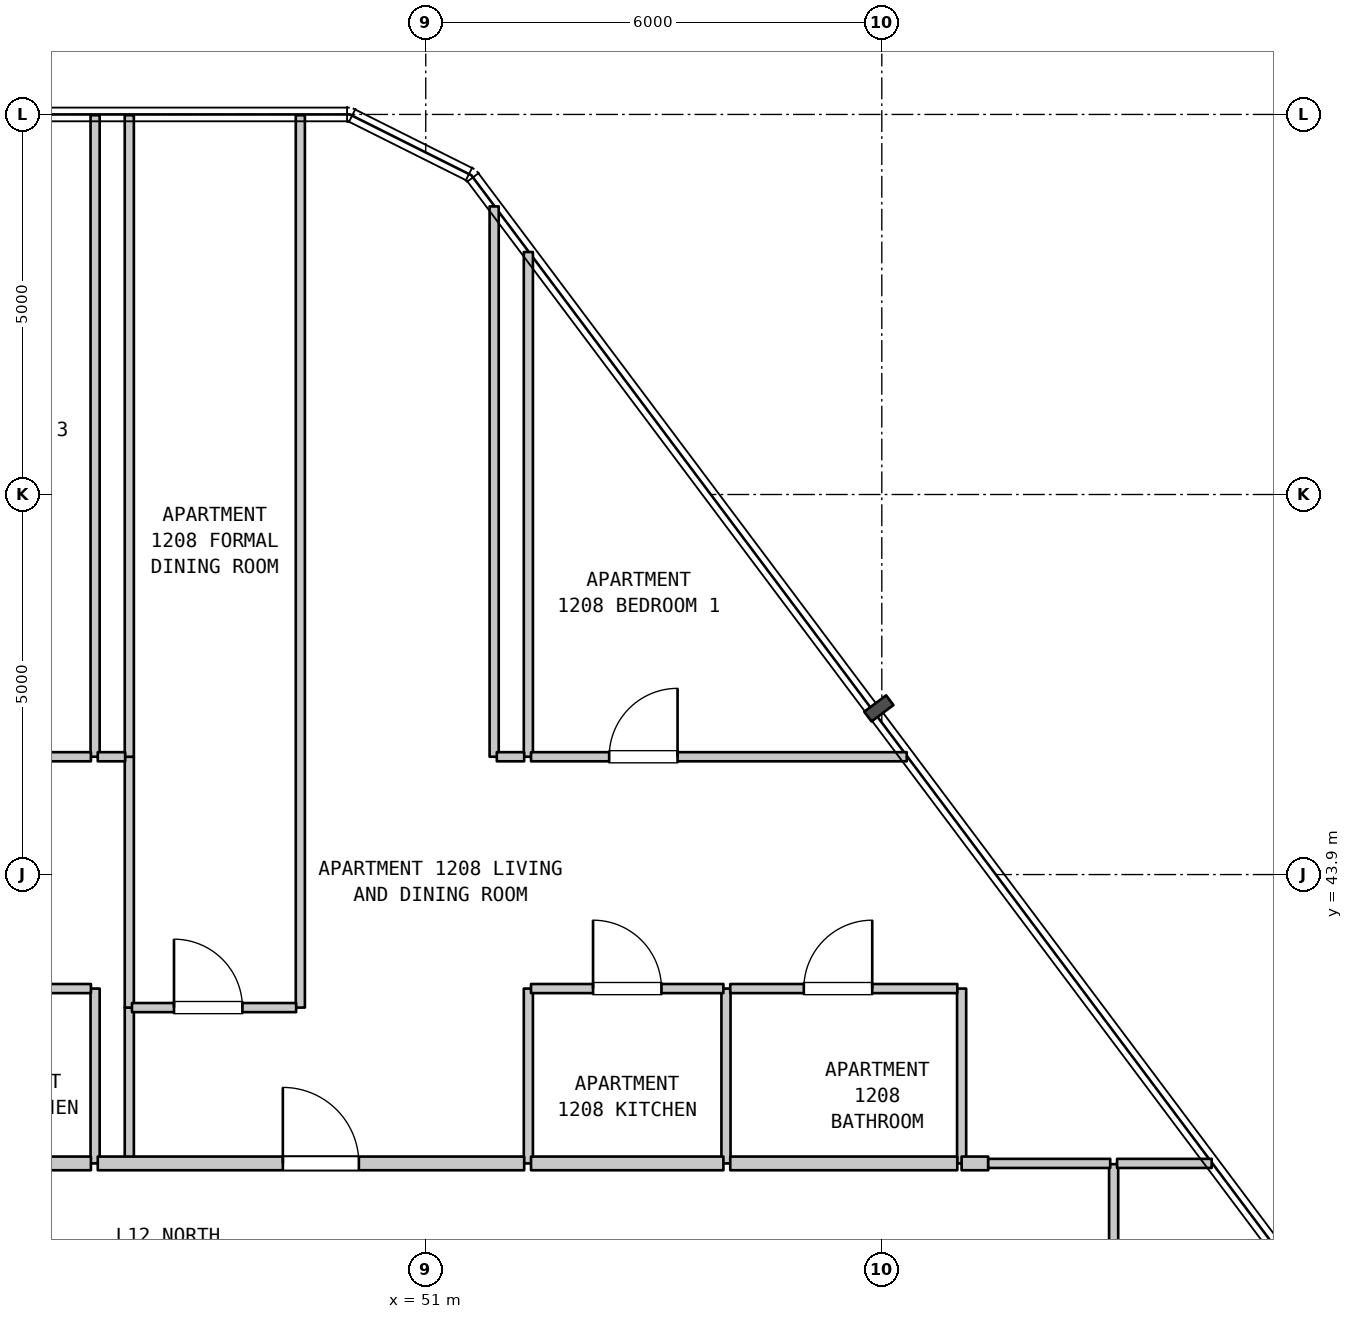
"""IFC4 building model, lengths in metres.
Left out: names, types, materials, properties, quantities, classifications, styles, units other than length and angle.
Written with IfcOpenShell. Run it as: python <this file> out.ifc"""

import sys

from ifc_helpers import new_model, si_unit, direction, frame, frame_2d, origin, place, context, subcontext, project, spatial, rectangle, extrude, element, fill, save


model = new_model("IFC4")
c1 = context("Model", 3, precision=1e-05, world=origin(), true_north=direction((0.0, 1.0)))
c2 = subcontext(c1, "Body", "Model", "MODEL_VIEW")
j1 = project(units=[si_unit("LENGTHUNIT", "METRE"), si_unit("PLANEANGLEUNIT", "RADIAN")], contexts=[c1])
p1 = place(None, origin())
s1 = spatial("IfcSite", under=j1, at=p1, CompositionType="ELEMENT")
p2 = place(p1, origin())
s2 = spatial("IfcBuilding", under=s1, at=p2, CompositionType="ELEMENT")
p3 = place(p2, frame((0.0, 0.0, 53.6)))
s3 = spatial("IfcBuildingStorey", under=s2, at=p3, CompositionType="ELEMENT", Elevation=53.6)
p4 = place(p3, frame((46.65, 40.1, 0.0), z_axis=(0.0, 0.0, 1.0), x_axis=(0.0, 1.0, 0.0)))
e1 = element("IfcWall", 1, at=p4, inside=s3, PredefinedType="PARTITIONING", context=c2, shape_type="SweptSolid", body=[
    extrude(rectangle(XDim=2.3, YDim=0.12, at=frame_2d((1.15, 0.0))), origin(), (0.0, 0.0, 1.0), 3.385),
])
p5 = place(p3, frame((46.65, 45.45, 0.0), z_axis=(0.0, 0.0, 1.0), x_axis=(0.0, 1.0, 0.0)))
e2 = element("IfcWall", 2, at=p5, inside=s3, PredefinedType="PARTITIONING", context=c2, shape_type="SweptSolid", body=[
    extrude(rectangle(XDim=8.44, YDim=0.12, at=frame_2d((4.22, 0.0))), origin(), (0.0, 0.0, 1.0), 3.385),
])
p6 = place(p3, frame((47.1, 40.1, 0.0), z_axis=(0.0, 0.0, 1.0), x_axis=(0.0, 1.0, 0.0)))
e3 = element("IfcWall", 3, at=p6, inside=s3, PredefinedType="PARTITIONING", context=c2, shape_type="SweptSolid", body=[
    extrude(rectangle(XDim=2.05, YDim=0.12, at=frame_2d((1.025, 0.0))), origin(), (0.0, 0.0, 1.0), 3.385),
])
p7 = place(p3, frame((47.1, 42.15, 0.0), z_axis=(0.0, 0.0, 1.0), x_axis=(0.0, 1.0, 0.0)))
e4 = element("IfcWall", 4, at=p7, inside=s3, PredefinedType="PARTITIONING", context=c2, shape_type="SweptSolid", body=[
    extrude(rectangle(XDim=3.3, YDim=0.12, at=frame_2d((1.65, 0.0))), origin(), (0.0, 0.0, 1.0), 3.385),
])
p8 = place(p3, frame((47.1, 45.45, 0.0), z_axis=(0.0, 0.0, 1.0), x_axis=(0.0, 1.0, 0.0)))
e5 = element("IfcWall", 5, at=p8, inside=s3, PredefinedType="PARTITIONING", context=c2, shape_type="SweptSolid", body=[
    extrude(rectangle(XDim=8.44, YDim=0.12, at=frame_2d((4.22, 0.0))), origin(), (0.0, 0.0, 1.0), 3.385),
])
p9 = place(p3, frame((49.35, 42.15, 0.0), z_axis=(0.0, 0.0, 1.0), x_axis=(0.0, 1.0, 0.0)))
e6 = element("IfcWall", 6, at=p9, inside=s3, PredefinedType="PARTITIONING", context=c2, shape_type="SweptSolid", body=[
    extrude(rectangle(XDim=11.74, YDim=0.12, at=frame_2d((5.87, 0.0))), origin(), (0.0, 0.0, 1.0), 3.385),
])
p10 = place(p3, frame((51.9, 45.45, 0.0), z_axis=(0.0, 0.0, 1.0), x_axis=(0.0, 1.0, 0.0)))
e7 = element("IfcWall", 7, at=p10, inside=s3, PredefinedType="PARTITIONING", context=c2, shape_type="SweptSolid", body=[
    extrude(rectangle(XDim=7.24, YDim=0.12, at=frame_2d((3.62, 0.0))), origin(), (0.0, 0.0, 1.0), 3.385),
])
p11 = place(p3, frame((52.35, 40.1, 0.0), z_axis=(0.0, 0.0, 1.0), x_axis=(0.0, 1.0, 0.0)))
e8 = element("IfcWall", 8, at=p11, inside=s3, PredefinedType="PARTITIONING", context=c2, shape_type="SweptSolid", body=[
    extrude(rectangle(XDim=2.3, YDim=0.12, at=frame_2d((1.15, 0.0))), origin(), (0.0, 0.0, 1.0), 3.385),
])
p12 = place(p3, frame((52.35, 45.45, 0.0), z_axis=(0.0, 0.0, 1.0), x_axis=(0.0, 1.0, 0.0)))
e9 = element("IfcWall", 9, at=p12, inside=s3, PredefinedType="PARTITIONING", context=c2, shape_type="SweptSolid", body=[
    extrude(rectangle(XDim=6.64, YDim=0.12, at=frame_2d((3.32, 0.0))), origin(), (0.0, 0.0, 1.0), 3.385),
])
for number, where, z_axis, x_axis in (
    (10, (54.95, 40.1, 0.0), (0.0, 0.0, 1.0), (0.0, 1.0, 0.0)),
    (11, (58.05, 40.1, 0.0), (0.0, 0.0, 1.0), (0.0, 1.0, 0.0)),
):
    element("IfcWall", number, at=place(p3, frame(where, z_axis=z_axis, x_axis=x_axis)), inside=s3, PredefinedType="PARTITIONING", context=c2, shape_type="SweptSolid", body=[
        extrude(rectangle(XDim=2.3, YDim=0.12, at=frame_2d((1.15, 0.0))), origin(), (0.0, 0.0, 1.0), 3.385),
    ])
p13 = place(p3, frame((60.05, 37.89, 0.0), z_axis=(0.0, 0.0, 1.0), x_axis=(0.0, 1.0, 0.0)))
e12 = element("IfcWall", 12, at=p13, inside=s3, PredefinedType="PARTITIONING", context=c2, shape_type="SweptSolid", body=[
    extrude(rectangle(XDim=2.2, YDim=0.12, at=frame_2d((1.1, 0.0))), origin(), (0.0, 0.0, 1.0), 3.385),
])
p14 = place(p3, frame((43.288, 40.1, 0.0), z_axis=(0.0, 0.0, 1.0), x_axis=(1.0, 0.0, 0.0)))
e13 = element("IfcWall", 13, at=p14, inside=s3, PredefinedType="STANDARD", context=c2, shape_type="SweptSolid", body=[
    extrude(rectangle(XDim=3.307, YDim=0.18, at=frame_2d((1.653, 0.0))), origin(), (0.0, 0.0, 1.0), 3.385),
])
p15 = place(p3, frame((46.685, 40.1, 0.0), z_axis=(0.0, 0.0, 1.0), x_axis=(1.0, 0.0, 0.0)))
e14 = element("IfcWall", 14, at=p15, inside=s3, PredefinedType="STANDARD", context=c2, shape_type="SweptSolid", body=[
    extrude(rectangle(XDim=5.61, YDim=0.18, at=frame_2d((2.805, 0.0))), origin(), (0.0, 0.0, 1.0), 3.385),
])
p16 = place(p15, frame((2.435, 0.0, 0.0)))
e15 = element("IfcOpeningElement", 15, at=p16, cuts=e14, PredefinedType="OPENING", context=c2, shape_type="SweptSolid", body=[
    extrude(rectangle(XDim=1.0, YDim=2.15, at=frame_2d((0.5, 1.075))), frame((0.0, 0.1, 0.0), z_axis=(0.0, -1.0, 0.0), x_axis=(1.0, 0.0, 0.0)), (0.0, 0.0, 1.0), 0.2),
])
p17 = place(p3, frame((52.385, 40.1, 0.0), z_axis=(0.0, 0.0, 1.0), x_axis=(1.0, 0.0, 0.0)))
e16 = element("IfcWall", 16, at=p17, inside=s3, PredefinedType="STANDARD", context=c2, shape_type="SweptSolid", body=[
    extrude(rectangle(XDim=2.531, YDim=0.18, at=frame_2d((1.266, 0.0))), origin(), (0.0, 0.0, 1.0), 3.385),
])
p18 = place(p3, frame((55.006, 40.1, 0.0), z_axis=(0.0, 0.0, 1.0), x_axis=(1.0, 0.0, 0.0)))
e17 = element("IfcWall", 17, at=p18, inside=s3, PredefinedType="STANDARD", context=c2, shape_type="SweptSolid", body=[
    extrude(rectangle(XDim=2.987, YDim=0.18, at=frame_2d((1.493, 0.0))), origin(), (0.0, 0.0, 1.0), 3.385),
])
p19 = place(p3, frame((58.05, 40.1, 0.0), z_axis=(0.0, 0.0, 1.0), x_axis=(1.0, 0.0, 0.0)))
e18 = element("IfcWall", 18, at=p19, inside=s3, PredefinedType="STANDARD", context=c2, shape_type="SweptSolid", body=[
    extrude(rectangle(XDim=0.35, YDim=0.18, at=frame_2d((0.175, 0.0))), origin(), (0.0, 0.0, 1.0), 3.385),
])
p20 = place(p3, frame((58.4, 40.1, 0.0), z_axis=(0.0, 0.0, 1.0), x_axis=(1.0, 0.0, 0.0)))
e19 = element("IfcWall", 19, at=p20, inside=s3, PredefinedType="PARTITIONING", context=c2, shape_type="SweptSolid", body=[
    extrude(rectangle(XDim=1.605, YDim=0.12, at=frame_2d((0.802, 0.0))), origin(), (0.0, 0.0, 1.0), 3.385),
])
p21 = place(p3, frame((60.095, 40.1, 0.0), z_axis=(0.0, 0.0, 1.0), x_axis=(1.0, 0.0, 0.0)))
e20 = element("IfcWall", 20, at=p21, inside=s3, PredefinedType="PARTITIONING", context=c2, shape_type="SweptSolid", body=[
    extrude(rectangle(XDim=1.245, YDim=0.12, at=frame_2d((0.623, 0.0))), origin(), (0.0, 0.0, 1.0), 3.385),
])
p22 = place(p3, frame((47.135, 42.15, 0.0), z_axis=(0.0, 0.0, 1.0), x_axis=(1.0, 0.0, 0.0)))
e21 = element("IfcWall", 21, at=p22, inside=s3, PredefinedType="PARTITIONING", context=c2, shape_type="SweptSolid", body=[
    extrude(rectangle(XDim=2.16, YDim=0.12, at=frame_2d((1.08, 0.0))), origin(), (0.0, 0.0, 1.0), 3.385),
])
p23 = place(p22, frame((0.553, 0.0, 0.0)))
e22 = element("IfcOpeningElement", 22, at=p23, cuts=e21, PredefinedType="OPENING", context=c2, shape_type="SweptSolid", body=[
    extrude(rectangle(XDim=0.9, YDim=2.15, at=frame_2d((0.45, 1.075))), frame((0.0, 0.07, 0.0), z_axis=(0.0, -1.0, 0.0), x_axis=(1.0, 0.0, 0.0)), (0.0, 0.0, 1.0), 0.14),
])
p24 = place(p3, frame((43.288, 42.4, 0.0), z_axis=(0.0, 0.0, 1.0), x_axis=(1.0, 0.0, 0.0)))
e23 = element("IfcWall", 23, at=p24, inside=s3, PredefinedType="PARTITIONING", context=c2, shape_type="SweptSolid", body=[
    extrude(rectangle(XDim=3.307, YDim=0.12, at=frame_2d((1.653, 0.0))), origin(), (0.0, 0.0, 1.0), 3.385),
])
p25 = place(p24, frame((1.204, 0.0, 0.0)))
e24 = element("IfcOpeningElement", 24, at=p25, cuts=e23, PredefinedType="OPENING", context=c2, shape_type="SweptSolid", body=[
    extrude(rectangle(XDim=0.9, YDim=2.15, at=frame_2d((0.45, 1.075))), frame((0.0, 0.07, 0.0), z_axis=(0.0, -1.0, 0.0), x_axis=(1.0, 0.0, 0.0)), (0.0, 0.0, 1.0), 0.14),
])
p26 = place(p3, frame((52.385, 42.4, 0.0), z_axis=(0.0, 0.0, 1.0), x_axis=(1.0, 0.0, 0.0)))
e25 = element("IfcWall", 25, at=p26, inside=s3, PredefinedType="PARTITIONING", context=c2, shape_type="SweptSolid", body=[
    extrude(rectangle(XDim=2.531, YDim=0.12, at=frame_2d((1.266, 0.0))), origin(), (0.0, 0.0, 1.0), 3.385),
])
p27 = place(p26, frame((0.816, 0.0, 0.0)))
e26 = element("IfcOpeningElement", 26, at=p27, cuts=e25, PredefinedType="OPENING", context=c2, shape_type="SweptSolid", body=[
    extrude(rectangle(XDim=0.9, YDim=2.15, at=frame_2d((0.45, 1.075))), frame((0.0, 0.07, 0.0), z_axis=(0.0, -1.0, 0.0), x_axis=(1.0, 0.0, 0.0)), (0.0, 0.0, 1.0), 0.14),
])
p28 = place(p3, frame((55.006, 42.4, 0.0), z_axis=(0.0, 0.0, 1.0), x_axis=(1.0, 0.0, 0.0)))
e27 = element("IfcWall", 27, at=p28, inside=s3, PredefinedType="PARTITIONING", context=c2, shape_type="SweptSolid", body=[
    extrude(rectangle(XDim=2.987, YDim=0.12, at=frame_2d((1.493, 0.0))), origin(), (0.0, 0.0, 1.0), 3.385),
])
p29 = place(p28, frame((0.968, 0.0, 0.0)))
e28 = element("IfcOpeningElement", 28, at=p29, cuts=e27, PredefinedType="OPENING", context=c2, shape_type="SweptSolid", body=[
    extrude(rectangle(XDim=0.9, YDim=2.1, at=frame_2d((0.45, 1.05))), frame((0.0, 0.07, 0.0), z_axis=(0.0, -1.0, 0.0), x_axis=(1.0, 0.0, 0.0)), (0.0, 0.0, 1.0), 0.14),
])
p30 = place(p3, frame((38.235, 45.45, 0.0), z_axis=(0.0, 0.0, 1.0), x_axis=(1.0, 0.0, 0.0)))
e29 = element("IfcWall", 29, at=p30, inside=s3, PredefinedType="PARTITIONING", context=c2, shape_type="SweptSolid", body=[
    extrude(rectangle(XDim=8.36, YDim=0.12, at=frame_2d((4.18, 0.0))), origin(), (0.0, 0.0, 1.0), 3.385),
])
p31 = place(p30, frame((1.014, 0.0, 0.0)))
e30 = element("IfcOpeningElement", 30, at=p31, cuts=e29, PredefinedType="OPENING", context=c2, shape_type="SweptSolid", body=[
    extrude(rectangle(XDim=0.9, YDim=2.15, at=frame_2d((0.45, 1.075))), frame((0.0, 0.07, 0.0), z_axis=(0.0, -1.0, 0.0), x_axis=(1.0, 0.0, 0.0)), (0.0, 0.0, 1.0), 0.14),
])
p32 = place(p30, frame((3.73, 0.0, 0.0)))
e31 = element("IfcOpeningElement", 31, at=p32, cuts=e29, PredefinedType="OPENING", context=c2, shape_type="SweptSolid", body=[
    extrude(rectangle(XDim=0.9, YDim=2.15, at=frame_2d((0.45, 1.075))), frame((0.0, 0.07, 0.0), z_axis=(0.0, -1.0, 0.0), x_axis=(1.0, 0.0, 0.0)), (0.0, 0.0, 1.0), 0.14),
])
p33 = place(p30, frame((6.297, 0.0, 0.0)))
e32 = element("IfcOpeningElement", 32, at=p33, cuts=e29, PredefinedType="OPENING", context=c2, shape_type="SweptSolid", body=[
    extrude(rectangle(XDim=0.9, YDim=2.15, at=frame_2d((0.45, 1.075))), frame((0.0, 0.07, 0.0), z_axis=(0.0, -1.0, 0.0), x_axis=(1.0, 0.0, 0.0)), (0.0, 0.0, 1.0), 0.14),
])
for number, where, z_axis, x_axis in (
    (33, (46.685, 45.45, 0.0), (0.0, 0.0, 1.0), (1.0, 0.0, 0.0)),
    (34, (51.935, 45.45, 0.0), (0.0, 0.0, 1.0), (1.0, 0.0, 0.0)),
):
    element("IfcWall", number, at=place(p3, frame(where, z_axis=z_axis, x_axis=x_axis)), inside=s3, PredefinedType="PARTITIONING", context=c2, shape_type="SweptSolid", body=[
        extrude(rectangle(XDim=0.36, YDim=0.12, at=frame_2d((0.18, 0.0))), origin(), (0.0, 0.0, 1.0), 3.385),
    ])
p34 = place(p3, frame((52.385, 45.45, 0.0), z_axis=(0.0, 0.0, 1.0), x_axis=(1.0, 0.0, 0.0)))
e35 = element("IfcWall", 35, at=p34, inside=s3, PredefinedType="PARTITIONING", context=c2, shape_type="SweptSolid", body=[
    extrude(rectangle(XDim=4.943, YDim=0.12, at=frame_2d((2.471, 0.0))), origin(), (0.0, 0.0, 1.0), 3.385),
])
p35 = place(p34, frame((1.028, 0.0, 0.0)))
e36 = element("IfcOpeningElement", 36, at=p35, cuts=e35, PredefinedType="OPENING", context=c2, shape_type="SweptSolid", body=[
    extrude(rectangle(XDim=0.9, YDim=2.15, at=frame_2d((0.45, 1.075))), frame((0.0, 0.07, 0.0), z_axis=(0.0, -1.0, 0.0), x_axis=(1.0, 0.0, 0.0)), (0.0, 0.0, 1.0), 0.14),
])
p36 = place(p16, origin())
e37 = element("IfcDoor", 37, at=p36, inside=s3, OperationType="SINGLE_SWING_LEFT", PredefinedType="DOOR", context=c2, shape_type="SweptSolid", body=[
    extrude(rectangle(XDim=1.0, YDim=2.15, at=frame_2d((0.5, 1.075))), frame((0.0, 0.025, 0.0), z_axis=(0.0, -1.0, 0.0), x_axis=(1.0, 0.0, 0.0)), (0.0, 0.0, 1.0), 0.05),
])
fill(e15, e37)
p37 = place(p23, origin())
e38 = element("IfcDoor", 38, at=p37, inside=s3, OperationType="SINGLE_SWING_LEFT", PredefinedType="DOOR", context=c2, shape_type="SweptSolid", body=[
    extrude(rectangle(XDim=0.9, YDim=2.15, at=frame_2d((0.45, 1.075))), frame((0.0, 0.025, 0.0), z_axis=(0.0, -1.0, 0.0), x_axis=(1.0, 0.0, 0.0)), (0.0, 0.0, 1.0), 0.05),
])
fill(e22, e38)
p38 = place(p27, origin())
e39 = element("IfcDoor", 39, at=p38, inside=s3, OperationType="SINGLE_SWING_LEFT", PredefinedType="DOOR", context=c2, shape_type="SweptSolid", body=[
    extrude(rectangle(XDim=0.9, YDim=2.15, at=frame_2d((0.45, 1.075))), frame((0.0, 0.025, 0.0), z_axis=(0.0, -1.0, 0.0), x_axis=(1.0, 0.0, 0.0)), (0.0, 0.0, 1.0), 0.05),
])
fill(e26, e39)
p39 = place(p29, origin())
e40 = element("IfcDoor", 40, at=p39, inside=s3, OperationType="SINGLE_SWING_RIGHT", PredefinedType="DOOR", context=c2, shape_type="SweptSolid", body=[
    extrude(rectangle(XDim=0.9, YDim=2.1, at=frame_2d((0.45, 1.05))), frame((0.0, 0.025, 0.0), z_axis=(0.0, -1.0, 0.0), x_axis=(1.0, 0.0, 0.0)), (0.0, 0.0, 1.0), 0.05),
])
fill(e28, e40)
p40 = place(p35, origin())
e41 = element("IfcDoor", 41, at=p40, inside=s3, OperationType="SINGLE_SWING_RIGHT", PredefinedType="DOOR", context=c2, shape_type="SweptSolid", body=[
    extrude(rectangle(XDim=0.9, YDim=2.15, at=frame_2d((0.45, 1.075))), frame((0.0, 0.025, 0.0), z_axis=(0.0, -1.0, 0.0), x_axis=(1.0, 0.0, 0.0)), (0.0, 0.0, 1.0), 0.05),
])
fill(e36, e41)
save(model, sys.argv[1])
